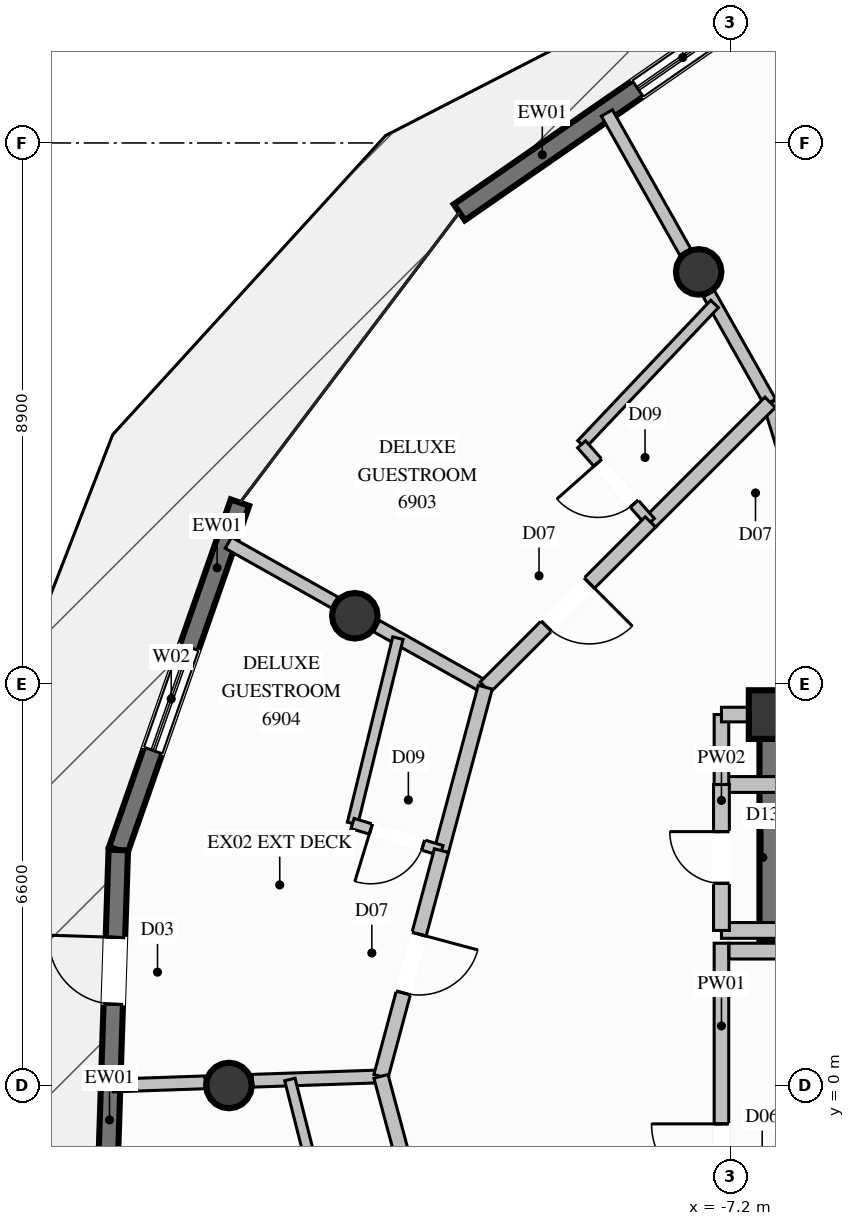
"""IFC4 building model, lengths in metres.
Left out: names, types, materials, properties, quantities, classifications, styles, units other than length and angle.
Written with IfcOpenShell. Run it as: python <this file> out.ifc"""

import sys

from ifc_helpers import new_model, si_unit, direction, frame, frame_2d, origin, origin_2d, place, context, subcontext, project, spatial, rectangle, circle, extrude, element, fill, save


model = new_model("IFC4")
c1 = context("Model", 3, precision=1e-05, world=origin(), true_north=direction((0.0, 1.0)))
c2 = subcontext(c1, "Body", "Model", "MODEL_VIEW")
j1 = project(units=[si_unit("LENGTHUNIT", "METRE"), si_unit("PLANEANGLEUNIT", "RADIAN")], contexts=[c1])
p1 = place(None, origin())
s1 = spatial("IfcSite", under=j1, at=p1, CompositionType="ELEMENT")
p2 = place(p1, origin())
s2 = spatial("IfcBuilding", under=s1, at=p2, CompositionType="ELEMENT")
p3 = place(p2, frame((0.0, 0.0, 258.2)))
s3 = spatial("IfcBuildingStorey", under=s2, at=p3, CompositionType="ELEMENT", Elevation=258.2)
p4 = place(p3, frame((-6.5, 6.1, 0.0), z_axis=(0.0, 0.0, 1.0), x_axis=(1.0, 0.0, 0.0)))
e1 = element("IfcColumn", 1, at=p4, inside=s3, PredefinedType="COLUMN", context=c2, shape_type="SweptSolid", body=[
    extrude(rectangle(XDim=0.8, YDim=0.8, at=origin_2d()), origin(), (0.0, 0.0, 1.0), 3.8),
])
p5 = place(p3, frame((-6.5, 2.35, 0.0), z_axis=(0.0, 0.0, 1.0), x_axis=(0.0, 1.0, 0.0)))
e2 = element("IfcWall", 2, at=p5, inside=s3, PredefinedType="SHEAR", context=c2, shape_type="SweptSolid", body=[
    extrude(rectangle(XDim=3.975, YDim=0.45, at=frame_2d((1.987, 0.0))), origin(), (0.0, 0.0, 1.0), 3.8),
])
for number, where, z_axis, x_axis in (
    (3, (-7.725, 13.38, 0.0), (0.0, 0.0, 1.0), (1.0, 0.0, 0.0)),
    (4, (-13.38, 7.725, 0.0), (0.0, 0.0, 1.0), (1.0, 0.0, 0.0)),
    (5, (-15.45, 0.0, 0.0), (0.0, 0.0, 1.0), (1.0, 0.0, 0.0)),
):
    element("IfcColumn", number, at=place(p3, frame(where, z_axis=z_axis, x_axis=x_axis)), inside=s3, PredefinedType="COLUMN", context=c2, shape_type="SweptSolid", body=[
        extrude(circle(Radius=0.375, at=origin_2d()), origin(), (0.0, 0.0, 1.0), 3.8),
    ])
p6 = place(p3, frame((-11.661, 14.36, 0.0), z_axis=(0.0, 0.0, 1.0), x_axis=(0.821952888389, 0.569555483925, 0.0)))
e6 = element("IfcWall", 6, at=p6, inside=s3, PredefinedType="SOLIDWALL", context=c2, shape_type="SweptSolid", body=[
    extrude(rectangle(XDim=5.915, YDim=0.32, at=frame_2d((2.958, 0.0))), origin(), (0.0, 0.0, 1.0), 3.57),
])
p7 = place(p6, frame((3.57, 0.0, 0.35)))
e7 = element("IfcOpeningElement", 7, at=p7, cuts=e6, PredefinedType="OPENING", context=c2, shape_type="SweptSolid", body=[
    extrude(rectangle(XDim=1.8, YDim=2.6, at=frame_2d((0.9, 1.3))), frame((0.0, 0.17, 0.0), z_axis=(0.0, -1.0, 0.0), x_axis=(1.0, 0.0, 0.0)), (0.0, 0.0, 1.0), 0.34),
])
p8 = place(p3, frame((-17.27, 3.872, 0.0), z_axis=(0.0, 0.0, 1.0), x_axis=(0.3305660024, 0.943782876544, 0.0)))
e8 = element("IfcWall", 8, at=p8, inside=s3, PredefinedType="SOLIDWALL", context=c2, shape_type="SweptSolid", body=[
    extrude(rectangle(XDim=6.053, YDim=0.32, at=frame_2d((3.027, 0.0))), origin(), (0.0, 0.0, 1.0), 3.57),
])
p9 = place(p8, frame((1.734, 0.0, 0.35)))
e9 = element("IfcOpeningElement", 9, at=p9, cuts=e8, PredefinedType="OPENING", context=c2, shape_type="SweptSolid", body=[
    extrude(rectangle(XDim=1.8, YDim=2.6, at=frame_2d((0.9, 1.3))), frame((0.0, 0.17, 0.0), z_axis=(0.0, -1.0, 0.0), x_axis=(1.0, 0.0, 0.0)), (0.0, 0.0, 1.0), 0.34),
])
p10 = place(p3, frame((-17.468, -2.22, 0.0), z_axis=(0.0, 0.0, 1.0), x_axis=(0.032483949851, 0.999472257245, 0.0)))
e10 = element("IfcWall", 10, at=p10, inside=s3, PredefinedType="SOLIDWALL", context=c2, shape_type="SweptSolid", body=[
    extrude(rectangle(XDim=6.095, YDim=0.32, at=frame_2d((3.048, 0.0))), origin(), (0.0, 0.0, 1.0), 3.57),
])
p11 = place(p10, frame((3.559, 0.0, 0.0)))
e11 = element("IfcOpeningElement", 11, at=p11, cuts=e10, PredefinedType="OPENING", context=c2, shape_type="SweptSolid", body=[
    extrude(rectangle(XDim=1.1, YDim=2.2, at=frame_2d((0.55, 1.1))), frame((0.0, 0.17, 0.0), z_axis=(0.0, -1.0, 0.0), x_axis=(1.0, 0.0, 0.0)), (0.0, 0.0, 1.0), 0.34),
])
p12 = place(p3, frame((-7.35, -3.38, 0.0), z_axis=(0.0, 0.0, 1.0), x_axis=(0.0, 1.0, 0.0)))
e12 = element("IfcWall", 12, at=p12, inside=s3, PredefinedType="PARTITIONING", context=c2, shape_type="SweptSolid", body=[
    extrude(rectangle(XDim=5.72, YDim=0.24, at=frame_2d((2.86, 0.0))), origin(), (0.0, 0.0, 1.0), 2.655),
])
p13 = place(p12, frame((1.599, 0.0, 0.0)))
e13 = element("IfcOpeningElement", 13, at=p13, cuts=e12, PredefinedType="OPENING", context=c2, shape_type="SweptSolid", body=[
    extrude(rectangle(XDim=1.15, YDim=2.2, at=frame_2d((0.575, 1.1))), frame((0.0, 0.13, 0.0), z_axis=(0.0, -1.0, 0.0), x_axis=(1.0, 0.0, 0.0)), (0.0, 0.0, 1.0), 0.26),
])
p14 = place(p3, frame((-7.225, 2.21, 0.0), z_axis=(0.0, 0.0, 1.0), x_axis=(1.0, 0.0, 0.0)))
e14 = element("IfcWall", 14, at=p14, inside=s3, PredefinedType="PARTITIONING", context=c2, shape_type="SweptSolid", body=[
    extrude(rectangle(XDim=0.875, YDim=0.26, at=frame_2d((0.438, 0.0))), origin(), (0.0, 0.0, 1.0), 3.57),
])
for number, where, z_axis, x_axis in (
    (15, (-7.35, 4.95, 0.0), (0.0, 0.0, 1.0), (1.0, 0.0, 0.0)),
    (16, (-7.35, 2.55, 0.0), (0.0, 0.0, 1.0), (1.0, 0.0, 0.0)),
):
    element("IfcWall", number, at=place(p3, frame(where, z_axis=z_axis, x_axis=x_axis)), inside=s3, PredefinedType="PARTITIONING", context=c2, shape_type="SweptSolid", body=[
        extrude(rectangle(XDim=0.93, YDim=0.26, at=frame_2d((0.465, 0.0))), origin(), (0.0, 0.0, 1.0), 3.57),
    ])
p15 = place(p3, frame((-7.35, 2.55, 0.0), z_axis=(0.0, 0.0, 1.0), x_axis=(0.0, 1.0, 0.0)))
e17 = element("IfcWall", 17, at=p15, inside=s3, PredefinedType="PARTITIONING", context=c2, shape_type="SweptSolid", body=[
    extrude(rectangle(XDim=2.4, YDim=0.26, at=frame_2d((1.2, 0.0))), origin(), (0.0, 0.0, 1.0), 2.655),
])
p16 = place(p15, frame((0.775, 0.0, 0.0)))
e18 = element("IfcOpeningElement", 18, at=p16, cuts=e17, PredefinedType="OPENING", context=c2, shape_type="SweptSolid", body=[
    extrude(rectangle(XDim=0.85, YDim=2.05, at=frame_2d((0.425, 1.025))), frame((0.0, 0.14, 0.0), z_axis=(0.0, -1.0, 0.0), x_axis=(1.0, 0.0, 0.0)), (0.0, 0.0, 1.0), 0.28),
])
p17 = place(p3, frame((-7.35, 4.95, 0.0), z_axis=(0.0, 0.0, 1.0), x_axis=(0.0, 1.0, 0.0)))
e19 = element("IfcWall", 19, at=p17, inside=s3, PredefinedType="PARTITIONING", context=c2, shape_type="SweptSolid", body=[
    extrude(rectangle(XDim=1.15, YDim=0.24, at=frame_2d((0.575, 0.0))), origin(), (0.0, 0.0, 1.0), 2.655),
])
p18 = place(p3, frame((-7.35, 6.1, 0.0), z_axis=(0.0, 0.0, 1.0), x_axis=(1.0, 0.0, 0.0)))
e20 = element("IfcWall", 20, at=p18, inside=s3, PredefinedType="PARTITIONING", context=c2, shape_type="SweptSolid", body=[
    extrude(rectangle(XDim=0.85, YDim=0.24, at=frame_2d((0.425, 0.0))), origin(), (0.0, 0.0, 1.0), 3.085),
])
p19 = place(p3, frame((-6.55, 11.235, 0.0), z_axis=(0.0, 0.0, 1.0), x_axis=(-0.491351277928, 0.87096149265, 0.0)))
e21 = element("IfcWall", 21, at=p19, inside=s3, PredefinedType="PARTITIONING", context=c2, shape_type="SweptSolid", body=[
    extrude(rectangle(XDim=2.052, YDim=0.21, at=frame_2d((1.026, 0.0))), origin(), (0.0, 0.0, 1.0), 3.085),
])
p20 = place(p3, frame((-7.945, 13.708, 0.0), z_axis=(0.0, 0.0, 1.0), x_axis=(-0.491290412496, 0.870995826965, 0.0)))
e22 = element("IfcWall", 22, at=p20, inside=s3, PredefinedType="PARTITIONING", context=c2, shape_type="SweptSolid", body=[
    extrude(rectangle(XDim=2.623, YDim=0.21, at=frame_2d((1.312, 0.0))), origin(), (0.0, 0.0, 1.0), 3.57),
])
p21 = place(p3, frame((-11.235, 6.55, 0.0), z_axis=(0.0, 0.0, 1.0), x_axis=(-0.871737625494, 0.489972970987, 0.0)))
e23 = element("IfcWall", 23, at=p21, inside=s3, PredefinedType="PARTITIONING", context=c2, shape_type="SweptSolid", body=[
    extrude(rectangle(XDim=2.051, YDim=0.21, at=frame_2d((1.025, 0.0))), origin(), (0.0, 0.0, 1.0), 3.085),
])
p22 = place(p3, frame((-13.71, 7.942, 0.0), z_axis=(0.0, 0.0, 1.0), x_axis=(-0.87171848357, 0.490007025871, 0.0)))
e24 = element("IfcWall", 24, at=p22, inside=s3, PredefinedType="PARTITIONING", context=c2, shape_type="SweptSolid", body=[
    extrude(rectangle(XDim=2.006, YDim=0.21, at=frame_2d((1.003, 0.0))), origin(), (0.0, 0.0, 1.0), 3.57),
])
p23 = place(p3, frame((-12.95, 0.15, 0.0), z_axis=(0.0, 0.0, 1.0), x_axis=(-0.999419634364, -0.034064562927, 0.0)))
e25 = element("IfcWall", 25, at=p23, inside=s3, PredefinedType="PARTITIONING", context=c2, shape_type="SweptSolid", body=[
    extrude(rectangle(XDim=2.114, YDim=0.21, at=frame_2d((1.057, 0.0))), origin(), (0.0, 0.0, 1.0), 3.57),
])
p24 = place(p3, frame((-15.842, 0.052, 0.0), z_axis=(0.0, 0.0, 1.0), x_axis=(-0.999410584372, -0.034329052487, 0.0)))
e26 = element("IfcWall", 26, at=p24, inside=s3, PredefinedType="PARTITIONING", context=c2, shape_type="SweptSolid", body=[
    extrude(rectangle(XDim=1.515, YDim=0.21, at=frame_2d((0.757, 0.0))), origin(), (0.0, 0.0, 1.0), 3.57),
])
p25 = place(p3, frame((-6.55, 11.235, 0.0), z_axis=(0.0, 0.0, 1.0), x_axis=(0.295638642954, -0.955299844443, 0.0)))
e27 = element("IfcWall", 27, at=p25, inside=s3, PredefinedType="PARTITIONING", context=c2, shape_type="SweptSolid", body=[
    extrude(rectangle(XDim=2.706, YDim=0.24, at=frame_2d((1.353, 0.0))), origin(), (0.0, 0.0, 1.0), 3.57),
])
p26 = place(p25, frame((0.853, 0.0, 0.0)))
e28 = element("IfcOpeningElement", 28, at=p26, cuts=e27, PredefinedType="OPENING", context=c2, shape_type="SweptSolid", body=[
    extrude(rectangle(XDim=1.0, YDim=2.2, at=frame_2d((0.5, 1.1))), frame((0.0, 0.13, 0.0), z_axis=(0.0, -1.0, 0.0), x_axis=(1.0, 0.0, 0.0)), (0.0, 0.0, 1.0), 0.26),
])
p27 = place(p3, frame((-6.55, 11.235, 0.0), z_axis=(0.0, 0.0, 1.0), x_axis=(-0.707106781187, -0.707106781187, 0.0)))
e29 = element("IfcWall", 29, at=p27, inside=s3, PredefinedType="PARTITIONING", context=c2, shape_type="SweptSolid", body=[
    extrude(rectangle(XDim=2.783, YDim=0.24, at=frame_2d((1.392, 0.0))), origin(), (0.0, 0.0, 1.0), 3.57),
])
p28 = place(p3, frame((-7.463, 12.853, 0.0), z_axis=(0.0, 0.0, 1.0), x_axis=(-0.687655215005, -0.726037399365, 0.0)))
e30 = element("IfcWall", 30, at=p28, inside=s3, PredefinedType="PLUMBINGWALL", context=c2, shape_type="SweptSolid", body=[
    extrude(rectangle(XDim=3.18, YDim=0.175, at=frame_2d((1.59, 0.0))), origin(), (0.0, 0.0, 1.0), 3.137),
])
p29 = place(p3, frame((-8.518, 9.267, 0.0), z_axis=(0.0, 0.0, 1.0), x_axis=(-0.663333009782, 0.748324340198, 0.0)))
e31 = element("IfcWall", 31, at=p29, inside=s3, PredefinedType="PLUMBINGWALL", context=c2, shape_type="SweptSolid", body=[
    extrude(rectangle(XDim=1.706, YDim=0.175, at=frame_2d((0.853, 0.0))), origin(), (0.0, 0.0, 1.0), 3.57),
])
p30 = place(p29, frame((0.403, 0.0, 0.0)))
e32 = element("IfcOpeningElement", 32, at=p30, cuts=e31, PredefinedType="OPENING", context=c2, shape_type="SweptSolid", body=[
    extrude(rectangle(XDim=0.9, YDim=2.1, at=frame_2d((0.45, 1.05))), frame((0.0, 0.098, 0.0), z_axis=(0.0, -1.0, 0.0), x_axis=(1.0, 0.0, 0.0)), (0.0, 0.0, 1.0), 0.195),
])
p31 = place(p3, frame((-8.518, 9.267, 0.0), z_axis=(0.0, 0.0, 1.0), x_axis=(-0.707106781187, -0.707106781187, 0.0)))
e33 = element("IfcWall", 33, at=p31, inside=s3, PredefinedType="PARTITIONING", context=c2, shape_type="SweptSolid", body=[
    extrude(rectangle(XDim=3.843, YDim=0.24, at=frame_2d((1.921, 0.0))), origin(), (0.0, 0.0, 1.0), 3.57),
])
p32 = place(p31, frame((1.421, 0.0, 0.0)))
e34 = element("IfcOpeningElement", 34, at=p32, cuts=e33, PredefinedType="OPENING", context=c2, shape_type="SweptSolid", body=[
    extrude(rectangle(XDim=1.0, YDim=2.2, at=frame_2d((0.5, 1.1))), frame((0.0, 0.13, 0.0), z_axis=(0.0, -1.0, 0.0), x_axis=(1.0, 0.0, 0.0)), (0.0, 0.0, 1.0), 0.26),
])
p33 = place(p3, frame((-11.235, 6.55, 0.0), z_axis=(0.0, 0.0, 1.0), x_axis=(-0.258727314432, -0.96595040078, 0.0)))
e35 = element("IfcWall", 35, at=p33, inside=s3, PredefinedType="PARTITIONING", context=c2, shape_type="SweptSolid", body=[
    extrude(rectangle(XDim=2.783, YDim=0.24, at=frame_2d((1.391, 0.0))), origin(), (0.0, 0.0, 1.0), 3.57),
])
p34 = place(p3, frame((-12.671, 7.357, 0.0), z_axis=(0.0, 0.0, 1.0), x_axis=(-0.237772855028, -0.97132078605, 0.0)))
e36 = element("IfcWall", 36, at=p34, inside=s3, PredefinedType="PLUMBINGWALL", context=c2, shape_type="SweptSolid", body=[
    extrude(rectangle(XDim=3.138, YDim=0.175, at=frame_2d((1.569, 0.0))), origin(), (0.0, 0.0, 1.0), 3.57),
])
p35 = place(p3, frame((-11.955, 3.862, 0.0), z_axis=(0.0, 0.0, 1.0), x_axis=(-0.956292043568, 0.292413281859, 0.0)))
e37 = element("IfcWall", 37, at=p35, inside=s3, PredefinedType="PLUMBINGWALL", context=c2, shape_type="SweptSolid", body=[
    extrude(rectangle(XDim=1.529, YDim=0.175, at=frame_2d((0.764, 0.0))), origin(), (0.0, 0.0, 1.0), 3.57),
])
p36 = place(p35, frame((0.314, 0.0, 0.0)))
e38 = element("IfcOpeningElement", 38, at=p36, cuts=e37, PredefinedType="OPENING", context=c2, shape_type="SweptSolid", body=[
    extrude(rectangle(XDim=0.9, YDim=2.1, at=frame_2d((0.45, 1.05))), frame((0.0, 0.098, 0.0), z_axis=(0.0, -1.0, 0.0), x_axis=(1.0, 0.0, 0.0)), (0.0, 0.0, 1.0), 0.195),
])
p37 = place(p3, frame((-11.955, 3.862, 0.0), z_axis=(0.0, 0.0, 1.0), x_axis=(-0.258868389222, -0.965912603221, 0.0)))
e39 = element("IfcWall", 39, at=p37, inside=s3, PredefinedType="PARTITIONING", context=c2, shape_type="SweptSolid", body=[
    extrude(rectangle(XDim=3.843, YDim=0.24, at=frame_2d((1.922, 0.0))), origin(), (0.0, 0.0, 1.0), 3.57),
])
p38 = place(p37, frame((1.422, 0.0, 0.0)))
e40 = element("IfcOpeningElement", 40, at=p38, cuts=e39, PredefinedType="OPENING", context=c2, shape_type="SweptSolid", body=[
    extrude(rectangle(XDim=1.0, YDim=2.2, at=frame_2d((0.5, 1.1))), frame((0.0, 0.13, 0.0), z_axis=(0.0, -1.0, 0.0), x_axis=(1.0, 0.0, 0.0)), (0.0, 0.0, 1.0), 0.26),
])
p39 = place(p3, frame((-12.95, 0.15, 0.0), z_axis=(0.0, 0.0, 1.0), x_axis=(0.258727314432, -0.96595040078, 0.0)))
e41 = element("IfcWall", 41, at=p39, inside=s3, PredefinedType="PARTITIONING", context=c2, shape_type="SweptSolid", body=[
    extrude(rectangle(XDim=2.783, YDim=0.24, at=frame_2d((1.391, 0.0))), origin(), (0.0, 0.0, 1.0), 3.57),
])
p40 = place(p3, frame((-14.448, 0.099, 0.0), z_axis=(0.0, 0.0, 1.0), x_axis=(0.244882234228, -0.969552830618, 0.0)))
e42 = element("IfcWall", 42, at=p40, inside=s3, PredefinedType="PLUMBINGWALL", context=c2, shape_type="SweptSolid", body=[
    extrude(rectangle(XDim=3.133, YDim=0.175, at=frame_2d((1.566, 0.0))), origin(), (0.0, 0.0, 1.0), 3.57),
])
p41 = place(p7, origin())
e43 = element("IfcWindow", 43, at=p41, inside=s3, PartitioningType="SINGLE_PANEL", PredefinedType="WINDOW", context=c2, shape_type="SweptSolid", body=[
    extrude(rectangle(XDim=1.8, YDim=2.6, at=frame_2d((0.9, 1.3))), frame((0.0, 0.03, 0.0), z_axis=(0.0, -1.0, 0.0), x_axis=(1.0, 0.0, 0.0)), (0.0, 0.0, 1.0), 0.06),
])
fill(e7, e43)
p42 = place(p9, origin())
e44 = element("IfcWindow", 44, at=p42, inside=s3, PartitioningType="SINGLE_PANEL", PredefinedType="WINDOW", context=c2, shape_type="SweptSolid", body=[
    extrude(rectangle(XDim=1.8, YDim=2.6, at=frame_2d((0.9, 1.3))), frame((0.0, 0.03, 0.0), z_axis=(0.0, -1.0, 0.0), x_axis=(1.0, 0.0, 0.0)), (0.0, 0.0, 1.0), 0.06),
])
fill(e9, e44)
p43 = place(p11, origin())
e45 = element("IfcDoor", 45, at=p43, inside=s3, OperationType="SINGLE_SWING_RIGHT", PredefinedType="DOOR", context=c2, shape_type="SweptSolid", body=[
    extrude(rectangle(XDim=1.1, YDim=2.2, at=frame_2d((0.55, 1.1))), frame((0.0, 0.025, 0.0), z_axis=(0.0, -1.0, 0.0), x_axis=(1.0, 0.0, 0.0)), (0.0, 0.0, 1.0), 0.05),
])
fill(e11, e45)
p44 = place(p13, origin())
e46 = element("IfcDoor", 46, at=p44, inside=s3, OperationType="SINGLE_SWING_RIGHT", PredefinedType="DOOR", context=c2, shape_type="SweptSolid", body=[
    extrude(rectangle(XDim=1.15, YDim=2.2, at=frame_2d((0.575, 1.1))), frame((0.0, 0.025, 0.0), z_axis=(0.0, -1.0, 0.0), x_axis=(1.0, 0.0, 0.0)), (0.0, 0.0, 1.0), 0.05),
])
fill(e13, e46)
p45 = place(p16, origin())
e47 = element("IfcDoor", 47, at=p45, inside=s3, OperationType="SINGLE_SWING_RIGHT", PredefinedType="DOOR", context=c2, shape_type="SweptSolid", body=[
    extrude(rectangle(XDim=0.85, YDim=2.05, at=frame_2d((0.425, 1.025))), frame((0.0, 0.025, 0.0), z_axis=(0.0, -1.0, 0.0), x_axis=(1.0, 0.0, 0.0)), (0.0, 0.0, 1.0), 0.05),
])
fill(e18, e47)
p46 = place(p30, origin())
e48 = element("IfcDoor", 48, at=p46, inside=s3, OperationType="SINGLE_SWING_RIGHT", PredefinedType="DOOR", context=c2, shape_type="SweptSolid", body=[
    extrude(rectangle(XDim=0.9, YDim=2.1, at=frame_2d((0.45, 1.05))), frame((0.0, 0.025, 0.0), z_axis=(0.0, -1.0, 0.0), x_axis=(1.0, 0.0, 0.0)), (0.0, 0.0, 1.0), 0.05),
])
fill(e32, e48)
p47 = place(p32, origin())
e49 = element("IfcDoor", 49, at=p47, inside=s3, OperationType="SINGLE_SWING_LEFT", PredefinedType="DOOR", context=c2, shape_type="SweptSolid", body=[
    extrude(rectangle(XDim=1.0, YDim=2.2, at=frame_2d((0.5, 1.1))), frame((0.0, 0.025, 0.0), z_axis=(0.0, -1.0, 0.0), x_axis=(1.0, 0.0, 0.0)), (0.0, 0.0, 1.0), 0.05),
])
fill(e34, e49)
p48 = place(p36, origin())
e50 = element("IfcDoor", 50, at=p48, inside=s3, OperationType="SINGLE_SWING_RIGHT", PredefinedType="DOOR", context=c2, shape_type="SweptSolid", body=[
    extrude(rectangle(XDim=0.9, YDim=2.1, at=frame_2d((0.45, 1.05))), frame((0.0, 0.025, 0.0), z_axis=(0.0, -1.0, 0.0), x_axis=(1.0, 0.0, 0.0)), (0.0, 0.0, 1.0), 0.05),
])
fill(e38, e50)
p49 = place(p38, origin())
e51 = element("IfcDoor", 51, at=p49, inside=s3, OperationType="SINGLE_SWING_LEFT", PredefinedType="DOOR", context=c2, shape_type="SweptSolid", body=[
    extrude(rectangle(XDim=1.0, YDim=2.2, at=frame_2d((0.5, 1.1))), frame((0.0, 0.025, 0.0), z_axis=(0.0, -1.0, 0.0), x_axis=(1.0, 0.0, 0.0)), (0.0, 0.0, 1.0), 0.05),
])
fill(e40, e51)
save(model, sys.argv[1])
